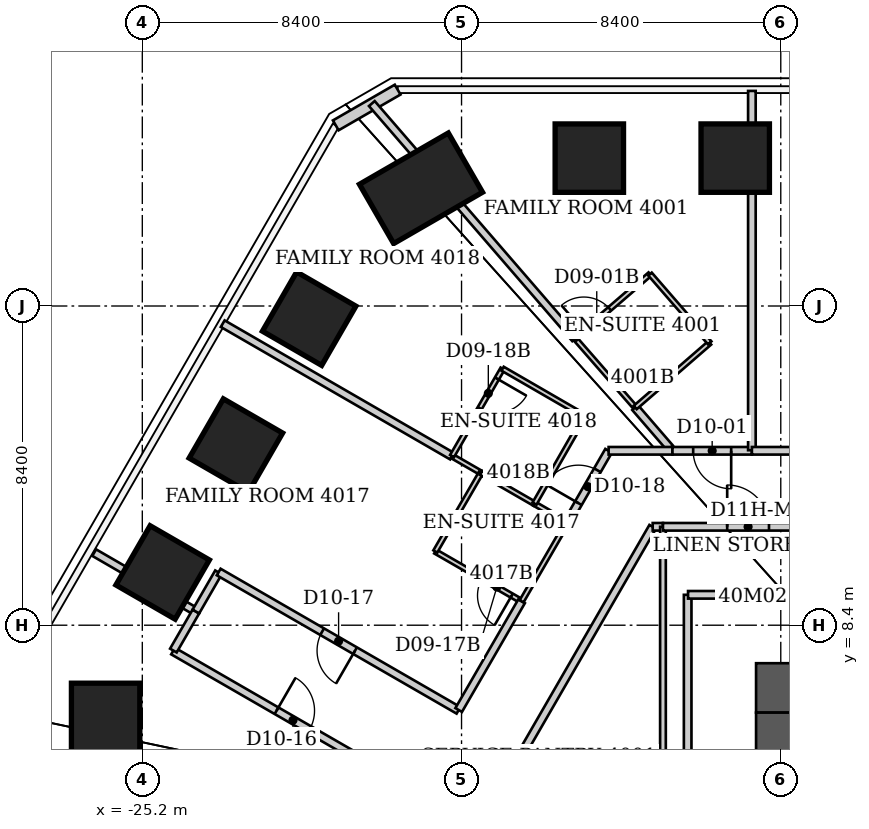
"""IFC4 building model, lengths in metres.
Left out: names, types, materials, properties, quantities, classifications, styles, units other than length and angle.
Written with IfcOpenShell. Run it as: python <this file> out.ifc"""

import sys

from ifc_helpers import new_model, si_unit, direction, frame, frame_2d, origin, origin_2d, place, context, subcontext, project, spatial, rectangle, extrude, element, fill, save


model = new_model("IFC4")
c1 = context("Model", 3, precision=1e-05, world=origin(), true_north=direction((0.0, 1.0)))
c2 = subcontext(c1, "Body", "Model", "MODEL_VIEW")
j1 = project(units=[si_unit("LENGTHUNIT", "METRE"), si_unit("PLANEANGLEUNIT", "RADIAN")], contexts=[c1])
p1 = place(None, origin())
s1 = spatial("IfcSite", under=j1, at=p1, CompositionType="ELEMENT")
p2 = place(p1, origin())
s2 = spatial("IfcBuilding", under=s1, at=p2, CompositionType="ELEMENT")
p3 = place(p2, frame((0.0, 0.0, 161.4)))
s3 = spatial("IfcBuildingStorey", under=s2, at=p3, CompositionType="ELEMENT", Elevation=161.4)
p4 = place(p3, frame((-13.438, 20.691, 0.0), z_axis=(0.030661228378, -0.047210594322, 0.998414267155), x_axis=(0.001430243146, 0.998884958054, 0.047188928551)))
e1 = element("IfcColumn", 1, at=p4, inside=s3, PredefinedType="COLUMN", context=c2, shape_type="SweptSolid", body=[
    extrude(rectangle(XDim=1.8, YDim=1.8, at=origin_2d()), origin(), (0.0, 0.0, 1.0), 3.806),
])
p5 = place(p3, frame((-9.598, 20.692, 0.0), z_axis=(0.021878437619, -0.047221495857, 0.998644813883), x_axis=(0.001498284872, 0.998884335352, 0.047199997152)))
e2 = element("IfcColumn", 2, at=p5, inside=s3, PredefinedType="COLUMN", context=c2, shape_type="SweptSolid", body=[
    extrude(rectangle(XDim=1.8, YDim=1.8, at=origin_2d()), origin(), (0.0, 0.0, 1.0), 3.805),
])
p6 = place(p3, frame((-26.166, 5.524, 0.0), z_axis=(0.06021332392, -0.012696739229, 0.998104778285), x_axis=(-0.998185498237, -0.001024676941, 0.060205158806)))
e3 = element("IfcColumn", 3, at=p6, inside=s3, PredefinedType="COLUMN", context=c2, shape_type="SweptSolid", body=[
    extrude(rectangle(XDim=1.8, YDim=2.7, at=origin_2d()), origin(), (0.0, 0.0, 1.0), 3.807),
])
p7 = place(p3, frame((-24.665, 9.788, 0.0), z_axis=(0.055410421986, -0.021997424469, 0.99822131737), x_axis=(-0.864198060677, 0.499682708675, 0.058982222519)))
e4 = element("IfcColumn", 4, at=p7, inside=s3, PredefinedType="COLUMN", context=c2, shape_type="SweptSolid", body=[
    extrude(rectangle(XDim=1.8, YDim=1.8, at=origin_2d()), origin(), (0.0, 0.0, 1.0), 3.807),
])
p8 = place(p3, frame((-22.738, 13.128, 0.0), z_axis=(0.051115371342, -0.029501970913, 0.998256907076), x_axis=(-0.864585430267, 0.499007902036, 0.059018196136)))
e5 = element("IfcColumn", 5, at=p8, inside=s3, PredefinedType="COLUMN", context=c2, shape_type="SweptSolid", body=[
    extrude(rectangle(XDim=1.8, YDim=1.8, at=origin_2d()), origin(), (0.0, 0.0, 1.0), 3.807),
])
p9 = place(p3, frame((-20.809, 16.467, 0.0), z_axis=(0.046752521918, -0.037004396634, 0.998220855484), x_axis=(-0.864714175605, 0.498788120692, 0.058989873412)))
e6 = element("IfcColumn", 6, at=p9, inside=s3, PredefinedType="COLUMN", context=c2, shape_type="SweptSolid", body=[
    extrude(rectangle(XDim=1.8, YDim=1.8, at=origin_2d()), origin(), (0.0, 0.0, 1.0), 3.807),
])
p10 = place(p3, frame((-17.867, 19.898, 0.0), z_axis=(0.041104111089, -0.045785234505, 0.998105287208), x_axis=(-0.498342902409, 0.864887659108, 0.060197082496)))
e7 = element("IfcColumn", 7, at=p10, inside=s3, PredefinedType="COLUMN", context=c2, shape_type="SweptSolid", body=[
    extrude(rectangle(XDim=1.8, YDim=2.7, at=origin_2d()), origin(), (0.0, 0.0, 1.0), 3.807),
])
p11 = place(p3, frame((-9.05, 6.75, 0.0), z_axis=(0.0, 0.0, 1.0), x_axis=(1.0, 0.0, 0.0)))
e8 = element("IfcWall", 8, at=p11, inside=s3, PredefinedType="SHEAR", context=c2, shape_type="SweptSolid", body=[
    extrude(rectangle(XDim=18.1, YDim=1.3, at=frame_2d((9.05, 0.0))), origin(), (0.0, 0.0, 1.0), 3.8),
])
p12 = place(p3, frame((-8.4, -9.2, 0.0), z_axis=(0.0, 0.0, 1.0), x_axis=(0.0, 1.0, 0.0)))
e9 = element("IfcWall", 9, at=p12, inside=s3, PredefinedType="SHEAR", context=c2, shape_type="SweptSolid", body=[
    extrude(rectangle(XDim=15.3, YDim=1.3, at=frame_2d((7.65, 0.0))), origin(), (0.0, 0.0, 1.0), 3.8),
])
p13 = place(p12, frame((10.7, 0.0, 0.0)))
e10 = element("IfcOpeningElement", 10, at=p13, cuts=e9, PredefinedType="OPENING", context=c2, shape_type="SweptSolid", body=[
    extrude(rectangle(XDim=1.2, YDim=2.2, at=frame_2d((0.6, 1.1))), frame((0.0, 0.65, 0.0), z_axis=(0.0, -1.0, 0.0), x_axis=(1.0, 0.0, 0.0)), (0.0, 0.0, 1.0), 1.3),
])
p14 = place(p3, frame((-20.11, 21.554, 0.0), z_axis=(0.0, 0.0, 1.0), x_axis=(0.865988793993, 0.500063404658, 0.0)))
e11 = element("IfcWall", 11, at=p14, inside=s3, PredefinedType="SOLIDWALL", context=c2, shape_type="SweptSolid", body=[
    extrude(rectangle(XDim=1.88, YDim=0.3, at=frame_2d((0.94, 0.0))), origin(), (0.0, 0.0, 1.0), 3.64),
])
p15 = place(p3, frame((-26.466, 10.31, 0.0), z_axis=(0.0, 0.0, 1.0), x_axis=(0.865362911021, -0.501145719556, 0.0)))
e12 = element("IfcWall", 12, at=p15, inside=s3, PredefinedType="PARTITIONING", context=c2, shape_type="SweptSolid", body=[
    extrude(rectangle(XDim=3.077, YDim=0.2, at=frame_2d((1.539, 0.0))), origin(), (0.0, 0.0, 1.0), 3.64),
])
p16 = place(p3, frame((-24.39, 7.72, 0.0), z_axis=(0.0, 0.0, 1.0), x_axis=(0.86620846199, -0.499682799761, 0.0)))
e13 = element("IfcWall", 13, at=p16, inside=s3, PredefinedType="PARTITIONING", context=c2, shape_type="SweptSolid", body=[
    extrude(rectangle(XDim=7.284, YDim=0.2, at=frame_2d((3.642, 0.0))), origin(), (0.0, 0.0, 1.0), 3.64),
])
p17 = place(p16, frame((3.142, 0.0, 0.0)))
e14 = element("IfcOpeningElement", 14, at=p17, cuts=e13, PredefinedType="OPENING", context=c2, shape_type="SweptSolid", body=[
    extrude(rectangle(XDim=1.0, YDim=2.13, at=frame_2d((0.5, 1.065))), frame((0.0, 0.1, 0.0), z_axis=(0.0, -1.0, 0.0), x_axis=(1.0, 0.0, 0.0)), (0.0, 0.0, 1.0), 0.2),
])
p18 = place(p3, frame((-23.79, 8.76, 0.0), z_axis=(0.0, 0.0, 1.0), x_axis=(-0.499704629046, -0.866195869137, 0.0)))
e15 = element("IfcWall", 15, at=p18, inside=s3, PredefinedType="PARTITIONING", context=c2, shape_type="SweptSolid", body=[
    extrude(rectangle(XDim=1.186, YDim=0.2, at=frame_2d((0.593, 0.0))), origin(), (0.0, 0.0, 1.0), 3.64),
])
p19 = place(p3, frame((-23.195, 9.791, 0.0), z_axis=(0.0, 0.0, 1.0), x_axis=(-0.499734288277, -0.866178758179, 0.0)))
e16 = element("IfcWall", 16, at=p19, inside=s3, PredefinedType="PARTITIONING", context=c2, shape_type="SweptSolid", body=[
    extrude(rectangle(XDim=1.191, YDim=0.2, at=frame_2d((0.595, 0.0))), origin(), (0.0, 0.0, 1.0), 3.64),
])
p20 = place(p3, frame((-23.084, 16.335, 0.0), z_axis=(0.0, 0.0, 1.0), x_axis=(0.865889693368, -0.500234983702, 0.0)))
e17 = element("IfcWall", 17, at=p20, inside=s3, PredefinedType="PARTITIONING", context=c2, shape_type="SweptSolid", body=[
    extrude(rectangle(XDim=6.968, YDim=0.2, at=frame_2d((3.484, 0.0))), origin(), (0.0, 0.0, 1.0), 3.64),
])
p21 = place(p3, frame((-19.16, 22.127, 0.0), z_axis=(0.0, 0.0, 1.0), x_axis=(0.654096091269, -0.756411464341, 0.0)))
e18 = element("IfcWall", 18, at=p21, inside=s3, PredefinedType="PARTITIONING", context=c2, shape_type="SweptSolid", body=[
    extrude(rectangle(XDim=8.18, YDim=0.2, at=frame_2d((4.09, 0.0))), origin(), (0.0, 0.0, 1.0), 3.64),
])
p22 = place(p3, frame((-17.49, 10.34, 0.0), z_axis=(0.0, 0.0, 1.0), x_axis=(0.866114241029, -0.499846097802, 0.0)))
e19 = element("IfcWall", 19, at=p22, inside=s3, PredefinedType="PARTITIONING", context=c2, shape_type="SweptSolid", body=[
    extrude(rectangle(XDim=2.621, YDim=0.12, at=frame_2d((1.311, 0.0))), origin(), (0.0, 0.0, 1.0), 3.64),
])
p23 = place(p22, frame((1.421, 0.0, 0.0)))
e20 = element("IfcOpeningElement", 20, at=p23, cuts=e19, PredefinedType="OPENING", context=c2, shape_type="SweptSolid", body=[
    extrude(rectangle(XDim=0.9, YDim=2.03, at=frame_2d((0.45, 1.015))), frame((0.0, 0.06, 0.0), z_axis=(0.0, -1.0, 0.0), x_axis=(1.0, 0.0, 0.0)), (0.0, 0.0, 1.0), 0.12),
])
p24 = place(p3, frame((-17.051, 12.849, 0.0), z_axis=(0.0, 0.0, 1.0), x_axis=(0.865838315616, -0.500323906295, 0.0)))
e21 = element("IfcWall", 21, at=p24, inside=s3, PredefinedType="PARTITIONING", context=c2, shape_type="SweptSolid", body=[
    extrude(rectangle(XDim=0.878, YDim=0.12, at=frame_2d((0.439, 0.0))), origin(), (0.0, 0.0, 1.0), 3.64),
])
p25 = place(p3, frame((-16.88, 6.16, 0.0), z_axis=(0.0, 0.0, 1.0), x_axis=(-0.866202323954, 0.499693439997, 0.0)))
e22 = element("IfcWall", 22, at=p25, inside=s3, PredefinedType="PARTITIONING", context=c2, shape_type="SweptSolid", body=[
    extrude(rectangle(XDim=7.285, YDim=0.2, at=frame_2d((3.642, 0.0))), origin(), (0.0, 0.0, 1.0), 3.64),
])
p26 = place(p25, frame((3.142, 0.0, 0.0)))
e23 = element("IfcOpeningElement", 23, at=p26, cuts=e22, PredefinedType="OPENING", context=c2, shape_type="SweptSolid", body=[
    extrude(rectangle(XDim=1.0, YDim=2.13, at=frame_2d((0.5, 1.065))), frame((0.0, 0.1, 0.0), z_axis=(0.0, -1.0, 0.0), x_axis=(1.0, 0.0, 0.0)), (0.0, 0.0, 1.0), 0.2),
])
p27 = place(p3, frame((-16.875, 6.169, 0.0), z_axis=(0.0, 0.0, 1.0), x_axis=(0.500689767595, 0.865626799854, 0.0)))
e24 = element("IfcWall", 24, at=p27, inside=s3, PredefinedType="PARTITIONING", context=c2, shape_type="SweptSolid", body=[
    extrude(rectangle(XDim=3.305, YDim=0.2, at=frame_2d((1.653, 0.0))), origin(), (0.0, 0.0, 1.0), 3.64),
])
p28 = place(p3, frame((-16.29, 12.41, 0.0), z_axis=(0.0, 0.0, 1.0), x_axis=(-0.501547039172, -0.865130376012, 0.0)))
e25 = element("IfcWall", 25, at=p28, inside=s3, PredefinedType="PARTITIONING", context=c2, shape_type="SweptSolid", body=[
    extrude(rectangle(XDim=2.393, YDim=0.12, at=frame_2d((1.196, 0.0))), origin(), (0.0, 0.0, 1.0), 3.64),
])
p29 = place(p3, frame((-16.29, 12.41, 0.0), z_axis=(0.0, 0.0, 1.0), x_axis=(0.866138091645, -0.499804768086, 0.0)))
e26 = element("IfcWall", 26, at=p29, inside=s3, PredefinedType="PARTITIONING", context=c2, shape_type="SweptSolid", body=[
    extrude(rectangle(XDim=1.626, YDim=0.12, at=frame_2d((0.813, 0.0))), origin(), (0.0, 0.0, 1.0), 3.64),
])
p30 = place(p3, frame((-15.98, 3.7, 0.0), z_axis=(0.0, 0.0, 1.0), x_axis=(0.500093981358, 0.865971136822, 0.0)))
e27 = element("IfcWall", 27, at=p30, inside=s3, PredefinedType="PARTITIONING", context=c2, shape_type="SweptSolid", body=[
    extrude(rectangle(XDim=8.418, YDim=0.2, at=frame_2d((4.209, 0.0))), origin(), (0.0, 0.0, 1.0), 3.64),
])
p31 = place(p3, frame((-15.72, 15.15, 0.0), z_axis=(0.0, 0.0, 1.0), x_axis=(-0.500605174168, -0.865675724273, 0.0)))
e28 = element("IfcWall", 28, at=p31, inside=s3, PredefinedType="PARTITIONING", context=c2, shape_type="SweptSolid", body=[
    extrude(rectangle(XDim=2.657, YDim=0.12, at=frame_2d((1.329, 0.0))), origin(), (0.0, 0.0, 1.0), 3.64),
])
p32 = place(p31, frame((0.3, 0.0, 0.0)))
e29 = element("IfcOpeningElement", 29, at=p32, cuts=e28, PredefinedType="OPENING", context=c2, shape_type="SweptSolid", body=[
    extrude(rectangle(XDim=0.9, YDim=2.03, at=frame_2d((0.45, 1.015))), frame((0.0, 0.06, 0.0), z_axis=(0.0, -1.0, 0.0), x_axis=(1.0, 0.0, 0.0)), (0.0, 0.0, 1.0), 0.12),
])
p33 = place(p3, frame((-15.22, 9.03, 0.0), z_axis=(0.0, 0.0, 1.0), x_axis=(0.501502765098, 0.865156041763, 0.0)))
e30 = element("IfcWall", 30, at=p33, inside=s3, PredefinedType="PARTITIONING", context=c2, shape_type="SweptSolid", body=[
    extrude(rectangle(XDim=2.393, YDim=0.12, at=frame_2d((1.196, 0.0))), origin(), (0.0, 0.0, 1.0), 3.64),
])
p34 = place(p3, frame((-14.882, 11.597, 0.0), z_axis=(0.0, 0.0, 1.0), x_axis=(0.866181499781, -0.499729536286, 0.0)))
e31 = element("IfcWall", 31, at=p34, inside=s3, PredefinedType="PARTITIONING", context=c2, shape_type="SweptSolid", body=[
    extrude(rectangle(XDim=0.995, YDim=0.12, at=frame_2d((0.497, 0.0))), origin(), (0.0, 0.0, 1.0), 3.64),
])
p35 = place(p3, frame((-14.88, 11.6, 0.0), z_axis=(0.0, 0.0, 1.0), x_axis=(0.497704656183, 0.867346571569, 0.0)))
e32 = element("IfcWall", 32, at=p35, inside=s3, PredefinedType="PARTITIONING", context=c2, shape_type="SweptSolid", body=[
    extrude(rectangle(XDim=2.652, YDim=0.12, at=frame_2d((1.326, 0.0))), origin(), (0.0, 0.0, 1.0), 3.64),
])
p36 = place(p3, frame((-14.02, 11.1, 0.0), z_axis=(0.0, 0.0, 1.0), x_axis=(0.499641723021, 0.866232156305, 0.0)))
e33 = element("IfcWall", 33, at=p36, inside=s3, PredefinedType="PARTITIONING", context=c2, shape_type="SweptSolid", body=[
    extrude(rectangle(XDim=2.182, YDim=0.2, at=frame_2d((1.091, 0.0))), origin(), (0.0, 0.0, 1.0), 3.64),
])
p37 = place(p36, frame((0.591, 0.0, 0.0)))
e34 = element("IfcOpeningElement", 34, at=p37, cuts=e33, PredefinedType="OPENING", context=c2, shape_type="SweptSolid", body=[
    extrude(rectangle(XDim=1.0, YDim=2.13, at=frame_2d((0.5, 1.065))), frame((0.0, 0.1, 0.0), z_axis=(0.0, -1.0, 0.0), x_axis=(1.0, 0.0, 0.0)), (0.0, 0.0, 1.0), 0.2),
])
p38 = place(p3, frame((-13.81, 15.94, 0.0), z_axis=(0.0, 0.0, 1.0), x_axis=(0.657626528627, -0.753344110514, 0.0)))
e35 = element("IfcWall", 35, at=p38, inside=s3, PredefinedType="PARTITIONING", context=c2, shape_type="SweptSolid", body=[
    extrude(rectangle(XDim=2.403, YDim=0.12, at=frame_2d((1.201, 0.0))), origin(), (0.0, 0.0, 1.0), 3.64),
])
p39 = place(p3, frame((-13.56, 13.9, 0.0), z_axis=(0.0, 0.0, 1.0), x_axis=(-0.865508881864, 0.500893576935, 0.0)))
e36 = element("IfcWall", 36, at=p39, inside=s3, PredefinedType="PARTITIONING", context=c2, shape_type="SweptSolid", body=[
    extrude(rectangle(XDim=2.496, YDim=0.12, at=frame_2d((1.248, 0.0))), origin(), (0.0, 0.0, 1.0), 3.64),
])
p40 = place(p3, frame((-12.232, 14.128, 0.0), z_axis=(0.0, 0.0, 1.0), x_axis=(0.653452261281, -0.756967728656, 0.0)))
e37 = element("IfcWall", 37, at=p40, inside=s3, PredefinedType="PARTITIONING", context=c2, shape_type="SweptSolid", body=[
    extrude(rectangle(XDim=1.403, YDim=0.2, at=frame_2d((0.702, 0.0))), origin(), (0.0, 0.0, 1.0), 3.64),
])
p41 = place(p3, frame((-12.23, 14.13, 0.0), z_axis=(0.0, 0.0, 1.0), x_axis=(0.755390958893, 0.655274369423, 0.0)))
e38 = element("IfcWall", 38, at=p41, inside=s3, PredefinedType="PARTITIONING", context=c2, shape_type="SweptSolid", body=[
    extrude(rectangle(XDim=2.595, YDim=0.12, at=frame_2d((1.297, 0.0))), origin(), (0.0, 0.0, 1.0), 3.64),
])
p42 = place(p3, frame((-11.84, 17.64, 0.0), z_axis=(0.0, 0.0, 1.0), x_axis=(-0.757086659925, -0.653314464377, 0.0)))
e39 = element("IfcWall", 39, at=p42, inside=s3, PredefinedType="PARTITIONING", context=c2, shape_type="SweptSolid", body=[
    extrude(rectangle(XDim=2.602, YDim=0.12, at=frame_2d((1.301, 0.0))), origin(), (0.0, 0.0, 1.0), 3.64),
])
p43 = place(p42, frame((1.402, 0.0, 0.0)))
e40 = element("IfcOpeningElement", 40, at=p43, cuts=e39, PredefinedType="OPENING", context=c2, shape_type="SweptSolid", body=[
    extrude(rectangle(XDim=0.9, YDim=2.03, at=frame_2d((0.45, 1.015))), frame((0.0, 0.06, 0.0), z_axis=(0.0, -1.0, 0.0), x_axis=(1.0, 0.0, 0.0)), (0.0, 0.0, 1.0), 0.12),
])
p44 = place(p3, frame((-11.77, 10.99, 0.0), z_axis=(0.0, 0.0, 1.0), x_axis=(1.0, 0.0, 0.0)))
e41 = element("IfcWall", 41, at=p44, inside=s3, PredefinedType="PARTITIONING", context=c2, shape_type="SweptSolid", body=[
    extrude(rectangle(XDim=0.27, YDim=0.2, at=frame_2d((0.135, 0.0))), origin(), (0.0, 0.0, 1.0), 3.64),
])
p45 = place(p3, frame((-11.5, 10.99, 0.0), z_axis=(0.0, 0.0, 1.0), x_axis=(0.0, -1.0, 0.0)))
e42 = element("IfcWall", 42, at=p45, inside=s3, PredefinedType="PARTITIONING", context=c2, shape_type="SweptSolid", body=[
    extrude(rectangle(XDim=14.905, YDim=0.15, at=frame_2d((7.453, 0.0))), origin(), (0.0, 0.0, 1.0), 3.64),
])
p46 = place(p3, frame((-11.5, 10.99, 0.0), z_axis=(0.0, 0.0, 1.0), x_axis=(1.0, 0.0, 0.0)))
e43 = element("IfcWall", 43, at=p46, inside=s3, PredefinedType="PARTITIONING", context=c2, shape_type="SweptSolid", body=[
    extrude(rectangle(XDim=4.48, YDim=0.2, at=frame_2d((2.24, 0.0))), origin(), (0.0, 0.0, 1.0), 3.64),
])
p47 = place(p46, frame((1.69, 0.0, 0.0)))
e44 = element("IfcOpeningElement", 44, at=p47, cuts=e43, PredefinedType="OPENING", context=c2, shape_type="SweptSolid", body=[
    extrude(rectangle(XDim=1.1, YDim=2.2, at=frame_2d((0.55, 1.1))), frame((0.0, 0.1, 0.0), z_axis=(0.0, -1.0, 0.0), x_axis=(1.0, 0.0, 0.0)), (0.0, 0.0, 1.0), 0.2),
])
p48 = place(p3, frame((-11.25, 12.99, 0.0), z_axis=(0.0, 0.0, 1.0), x_axis=(-1.0, 0.0, 0.0)))
e45 = element("IfcWall", 45, at=p48, inside=s3, PredefinedType="PARTITIONING", context=c2, shape_type="SweptSolid", body=[
    extrude(rectangle(XDim=1.68, YDim=0.2, at=frame_2d((0.84, 0.0))), origin(), (0.0, 0.0, 1.0), 3.64),
])
p49 = place(p3, frame((-10.85, 9.2, 0.0), z_axis=(0.0, 0.0, 1.0), x_axis=(0.0, -1.0, 0.0)))
e46 = element("IfcWall", 46, at=p49, inside=s3, PredefinedType="PARTITIONING", context=c2, shape_type="SweptSolid", body=[
    extrude(rectangle(XDim=14.39, YDim=0.2, at=frame_2d((7.195, 0.0))), origin(), (0.0, 0.0, 1.0), 3.64),
])
p50 = place(p3, frame((-10.27, 15.83, 0.0), z_axis=(0.0, 0.0, 1.0), x_axis=(-0.655302876176, 0.755366229372, 0.0)))
e47 = element("IfcWall", 47, at=p50, inside=s3, PredefinedType="PARTITIONING", context=c2, shape_type="SweptSolid", body=[
    extrude(rectangle(XDim=2.396, YDim=0.12, at=frame_2d((1.198, 0.0))), origin(), (0.0, 0.0, 1.0), 3.64),
])
p51 = place(p3, frame((-9.16, 12.99, 0.0), z_axis=(0.0, 0.0, 1.0), x_axis=(-1.0, 0.0, 0.0)))
e48 = element("IfcWall", 48, at=p51, inside=s3, PredefinedType="PARTITIONING", context=c2, shape_type="SweptSolid", body=[
    extrude(rectangle(XDim=2.09, YDim=0.2, at=frame_2d((1.045, 0.0))), origin(), (0.0, 0.0, 1.0), 3.64),
])
p52 = place(p51, frame((0.545, 0.0, 0.0)))
e49 = element("IfcOpeningElement", 49, at=p52, cuts=e48, PredefinedType="OPENING", context=c2, shape_type="SweptSolid", body=[
    extrude(rectangle(XDim=1.0, YDim=2.13, at=frame_2d((0.5, 1.065))), frame((0.0, 0.1, 0.0), z_axis=(0.0, -1.0, 0.0), x_axis=(1.0, 0.0, 0.0)), (0.0, 0.0, 1.0), 0.2),
])
p53 = place(p3, frame((-9.16, 22.46, 0.0), z_axis=(0.0, 0.0, 1.0), x_axis=(0.0, -1.0, 0.0)))
e50 = element("IfcWall", 50, at=p53, inside=s3, PredefinedType="PARTITIONING", context=c2, shape_type="SweptSolid", body=[
    extrude(rectangle(XDim=9.455, YDim=0.2, at=frame_2d((4.728, 0.0))), origin(), (0.0, 0.0, 1.0), 3.64),
])
p54 = place(p3, frame((-7.02, 9.2, 0.0), z_axis=(0.0, 0.0, 1.0), x_axis=(-1.0, 0.0, 0.0)))
e51 = element("IfcWall", 51, at=p54, inside=s3, PredefinedType="PARTITIONING", context=c2, shape_type="SweptSolid", body=[
    extrude(rectangle(XDim=3.82, YDim=0.2, at=frame_2d((1.91, 0.0))), origin(), (0.0, 0.0, 1.0), 3.64),
])
p55 = place(p3, frame((-1.6, 12.99, 0.0), z_axis=(0.0, 0.0, 1.0), x_axis=(-1.0, 0.0, 0.0)))
e52 = element("IfcWall", 52, at=p55, inside=s3, PredefinedType="PARTITIONING", context=c2, shape_type="SweptSolid", body=[
    extrude(rectangle(XDim=7.56, YDim=0.2, at=frame_2d((3.78, 0.0))), origin(), (0.0, 0.0, 1.0), 3.64),
])
p56 = place(p55, frame((3.28, 0.0, 0.0)))
e53 = element("IfcOpeningElement", 53, at=p56, cuts=e52, PredefinedType="OPENING", context=c2, shape_type="SweptSolid", body=[
    extrude(rectangle(XDim=1.0, YDim=2.13, at=frame_2d((0.5, 1.065))), frame((0.0, 0.1, 0.0), z_axis=(0.0, -1.0, 0.0), x_axis=(1.0, 0.0, 0.0)), (0.0, 0.0, 1.0), 0.2),
])
p57 = place(p52, origin())
e54 = element("IfcDoor", 54, at=p57, inside=s3, OperationType="SINGLE_SWING_LEFT", PredefinedType="DOOR", context=c2, shape_type="SweptSolid", body=[
    extrude(rectangle(XDim=1.0, YDim=2.13, at=frame_2d((0.5, 1.065))), frame((0.0, 0.025, 0.0), z_axis=(0.0, -1.0, 0.0), x_axis=(1.0, 0.0, 0.0)), (0.0, 0.0, 1.0), 0.05),
])
fill(e49, e54)
p58 = place(p43, origin())
e55 = element("IfcDoor", 55, at=p58, inside=s3, OperationType="SINGLE_SWING_RIGHT", PredefinedType="DOOR", context=c2, shape_type="SweptSolid", body=[
    extrude(rectangle(XDim=0.9, YDim=2.03, at=frame_2d((0.45, 1.015))), frame((0.0, 0.025, 0.0), z_axis=(0.0, -1.0, 0.0), x_axis=(1.0, 0.0, 0.0)), (0.0, 0.0, 1.0), 0.05),
])
fill(e40, e55)
p59 = place(p17, origin())
e56 = element("IfcDoor", 56, at=p59, inside=s3, OperationType="SINGLE_SWING_LEFT", PredefinedType="DOOR", context=c2, shape_type="SweptSolid", body=[
    extrude(rectangle(XDim=1.0, YDim=2.13, at=frame_2d((0.5, 1.065))), frame((0.0, 0.025, 0.0), z_axis=(0.0, -1.0, 0.0), x_axis=(1.0, 0.0, 0.0)), (0.0, 0.0, 1.0), 0.05),
])
fill(e14, e56)
p60 = place(p26, origin())
e57 = element("IfcDoor", 57, at=p60, inside=s3, OperationType="SINGLE_SWING_LEFT", PredefinedType="DOOR", context=c2, shape_type="SweptSolid", body=[
    extrude(rectangle(XDim=1.0, YDim=2.13, at=frame_2d((0.5, 1.065))), frame((0.0, 0.025, 0.0), z_axis=(0.0, -1.0, 0.0), x_axis=(1.0, 0.0, 0.0)), (0.0, 0.0, 1.0), 0.05),
])
fill(e23, e57)
p61 = place(p23, origin())
e58 = element("IfcDoor", 58, at=p61, inside=s3, OperationType="SINGLE_SWING_RIGHT", PredefinedType="DOOR", context=c2, shape_type="SweptSolid", body=[
    extrude(rectangle(XDim=0.9, YDim=2.03, at=frame_2d((0.45, 1.015))), frame((0.0, 0.025, 0.0), z_axis=(0.0, -1.0, 0.0), x_axis=(1.0, 0.0, 0.0)), (0.0, 0.0, 1.0), 0.05),
])
fill(e20, e58)
p62 = place(p37, origin())
e59 = element("IfcDoor", 59, at=p62, inside=s3, OperationType="SINGLE_SWING_LEFT", PredefinedType="DOOR", context=c2, shape_type="SweptSolid", body=[
    extrude(rectangle(XDim=1.0, YDim=2.13, at=frame_2d((0.5, 1.065))), frame((0.0, 0.025, 0.0), z_axis=(0.0, -1.0, 0.0), x_axis=(1.0, 0.0, 0.0)), (0.0, 0.0, 1.0), 0.05),
])
fill(e34, e59)
p63 = place(p32, origin())
e60 = element("IfcDoor", 60, at=p63, inside=s3, OperationType="SINGLE_SWING_LEFT", PredefinedType="DOOR", context=c2, shape_type="SweptSolid", body=[
    extrude(rectangle(XDim=0.9, YDim=2.03, at=frame_2d((0.45, 1.015))), frame((0.0, 0.025, 0.0), z_axis=(0.0, -1.0, 0.0), x_axis=(1.0, 0.0, 0.0)), (0.0, 0.0, 1.0), 0.05),
])
fill(e29, e60)
p64 = place(p47, origin())
e61 = element("IfcDoor", 61, at=p64, inside=s3, OperationType="SINGLE_SWING_LEFT", PredefinedType="DOOR", context=c2, shape_type="SweptSolid", body=[
    extrude(rectangle(XDim=1.1, YDim=2.2, at=frame_2d((0.55, 1.1))), frame((0.0, 0.025, 0.0), z_axis=(0.0, -1.0, 0.0), x_axis=(1.0, 0.0, 0.0)), (0.0, 0.0, 1.0), 0.05),
])
fill(e44, e61)
save(model, sys.argv[1])
